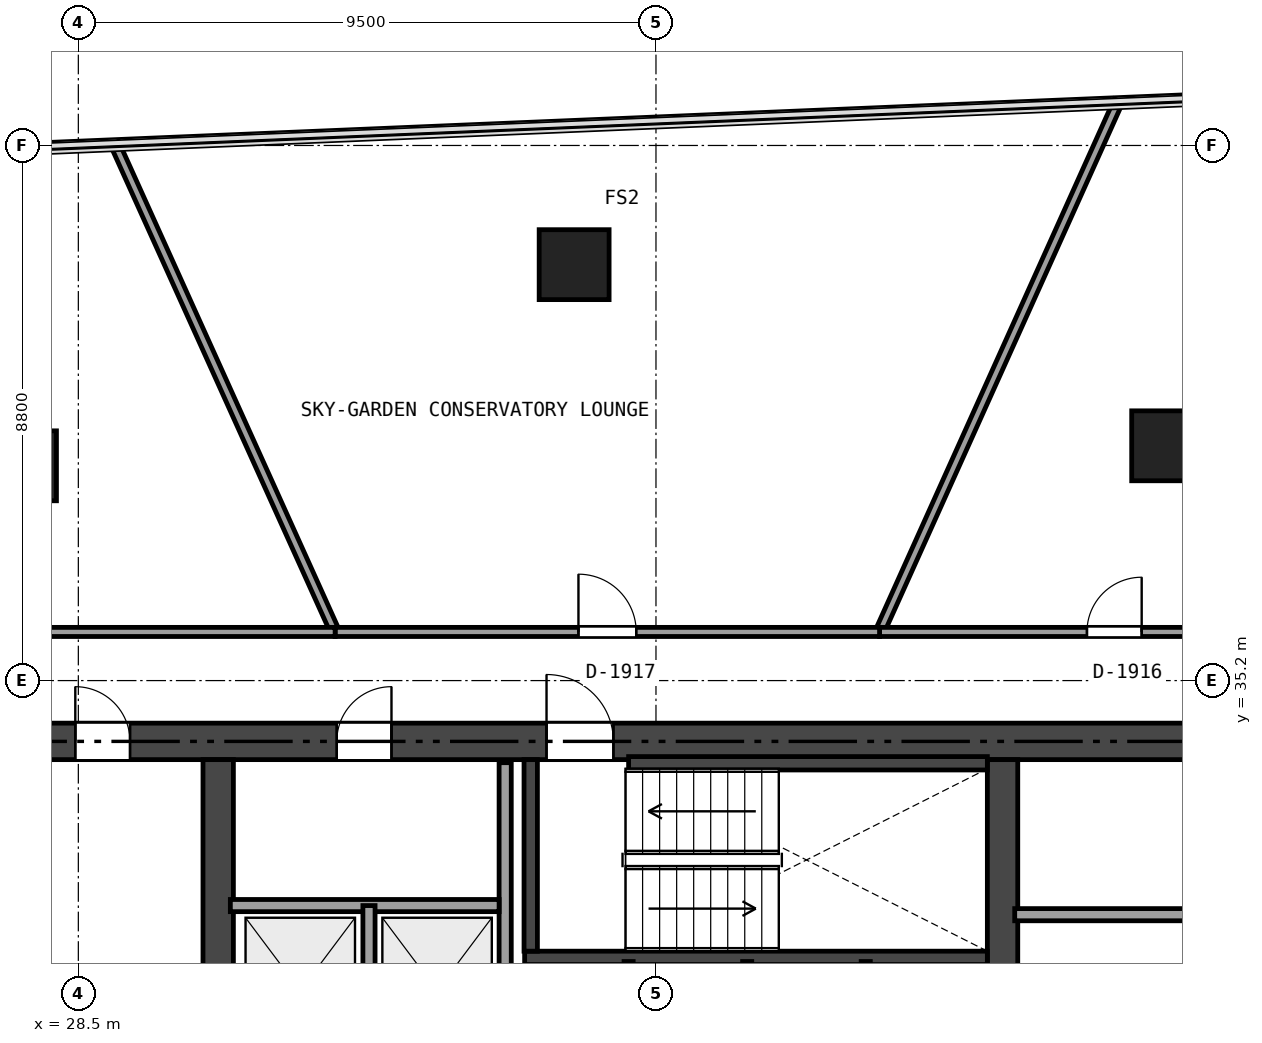
"""IFC4 building model, lengths in metres.
Left out: names, types, materials, properties, quantities, classifications, styles, units other than length and angle.
Written with IfcOpenShell. Run it as: python <this file> out.ifc"""

import sys

from ifc_helpers import new_model, si_unit, direction, frame, frame_2d, origin, origin_2d, place, context, subcontext, project, spatial, rectangle, extrude, element, fill, save


model = new_model("IFC4")
c1 = context("Model", 3, precision=1e-05, world=origin(), true_north=direction((0.0, 1.0)))
c2 = subcontext(c1, "Body", "Model", "MODEL_VIEW")
j1 = project(units=[si_unit("LENGTHUNIT", "METRE"), si_unit("PLANEANGLEUNIT", "RADIAN")], contexts=[c1])
p1 = place(None, origin())
s1 = spatial("IfcSite", under=j1, at=p1, CompositionType="ELEMENT")
p2 = place(p1, origin())
s2 = spatial("IfcBuilding", under=s1, at=p2, CompositionType="ELEMENT")
p3 = place(p2, frame((0.0, 0.0, 76.35)))
s3 = spatial("IfcBuildingStorey", under=s2, at=p3, CompositionType="ELEMENT", Elevation=76.35)
p4 = place(p3, frame((26.5, 34.2, 0.0), z_axis=(0.0, 0.0, 1.0), x_axis=(1.0, 0.0, 0.0)))
e1 = element("IfcWall", 1, at=p4, inside=s3, PredefinedType="SHEAR", context=c2, shape_type="SweptSolid", body=[
    extrude(rectangle(XDim=21.4, YDim=0.6, at=frame_2d((10.7, 0.0))), origin(), (0.0, 0.0, 1.0), 3.17),
])
p5 = place(p4, frame((9.7, 0.0, 0.0)))
e2 = element("IfcOpeningElement", 2, at=p5, cuts=e1, PredefinedType="OPENING", context=c2, shape_type="SweptSolid", body=[
    extrude(rectangle(XDim=1.1, YDim=2.15, at=frame_2d((0.55, 1.075))), frame((0.0, 0.31, 0.0), z_axis=(0.0, -1.0, 0.0), x_axis=(1.0, 0.0, 0.0)), (0.0, 0.0, 1.0), 0.62),
])
p6 = place(p4, frame((1.95, 0.0, 0.0)))
e3 = element("IfcOpeningElement", 3, at=p6, cuts=e1, PredefinedType="OPENING", context=c2, shape_type="SweptSolid", body=[
    extrude(rectangle(XDim=0.9, YDim=2.1, at=frame_2d((0.45, 1.05))), frame((0.0, 0.31, 0.0), z_axis=(0.0, -1.0, 0.0), x_axis=(1.0, 0.0, 0.0)), (0.0, 0.0, 1.0), 0.62),
])
p7 = place(p4, frame((6.25, 0.0, 0.0)))
e4 = element("IfcOpeningElement", 4, at=p7, cuts=e1, PredefinedType="OPENING", context=c2, shape_type="SweptSolid", body=[
    extrude(rectangle(XDim=0.9, YDim=2.1, at=frame_2d((0.45, 1.05))), frame((0.0, 0.31, 0.0), z_axis=(0.0, -1.0, 0.0), x_axis=(1.0, 0.0, 0.0)), (0.0, 0.0, 1.0), 0.62),
])
p8 = place(p3, frame((30.8, 18.9, 0.0), z_axis=(0.0, 0.0, 1.0), x_axis=(0.0, 1.0, 0.0)))
e5 = element("IfcWall", 5, at=p8, inside=s3, PredefinedType="SHEAR", context=c2, shape_type="SweptSolid", body=[
    extrude(rectangle(XDim=15.0, YDim=0.5, at=frame_2d((7.5, 0.0))), origin(), (0.0, 0.0, 1.0), 3.17),
])
p9 = place(p8, frame((6.6, 0.0, 0.0)))
e6 = element("IfcOpeningElement", 6, at=p9, cuts=e5, PredefinedType="OPENING", context=c2, shape_type="SweptSolid", body=[
    extrude(rectangle(XDim=1.1, YDim=2.15, at=frame_2d((0.55, 1.075))), frame((0.0, 0.26, 0.0), z_axis=(0.0, -1.0, 0.0), x_axis=(1.0, 0.0, 0.0)), (0.0, 0.0, 1.0), 0.52),
])
p10 = place(p8, frame((8.4, 0.0, 0.0)))
e7 = element("IfcOpeningElement", 7, at=p10, cuts=e5, PredefinedType="OPENING", context=c2, shape_type="SweptSolid", body=[
    extrude(rectangle(XDim=0.9, YDim=2.1, at=frame_2d((0.45, 1.05))), frame((0.0, 0.26, 0.0), z_axis=(0.0, -1.0, 0.0), x_axis=(1.0, 0.0, 0.0)), (0.0, 0.0, 1.0), 0.52),
])
p11 = place(p3, frame((43.7, 18.9, 0.0), z_axis=(0.0, 0.0, 1.0), x_axis=(0.0, 1.0, 0.0)))
e8 = element("IfcWall", 8, at=p11, inside=s3, PredefinedType="SHEAR", context=c2, shape_type="SweptSolid", body=[
    extrude(rectangle(XDim=15.0, YDim=0.5, at=frame_2d((7.5, 0.0))), origin(), (0.0, 0.0, 1.0), 3.17),
])
p12 = place(p11, frame((8.1, 0.0, 0.0)))
e9 = element("IfcOpeningElement", 9, at=p12, cuts=e8, PredefinedType="OPENING", context=c2, shape_type="SweptSolid", body=[
    extrude(rectangle(XDim=0.9, YDim=2.1, at=frame_2d((0.45, 1.05))), frame((0.0, 0.26, 0.0), z_axis=(0.0, -1.0, 0.0), x_axis=(1.0, 0.0, 0.0)), (0.0, 0.0, 1.0), 0.52),
])
p13 = place(p3, frame((35.84, 30.64, 0.0), z_axis=(0.0, 0.0, 1.0), x_axis=(1.0, 0.0, 0.0)))
e10 = element("IfcWall", 10, at=p13, inside=s3, PredefinedType="SHEAR", context=c2, shape_type="SweptSolid", body=[
    extrude(rectangle(XDim=7.61, YDim=0.22, at=frame_2d((3.805, 0.0))), origin(), (0.0, 0.0, 1.0), 3.17),
])
p14 = place(p3, frame((35.94, 30.75, 0.0), z_axis=(0.0, 0.0, 1.0), x_axis=(0.0, 1.0, 0.0)))
e11 = element("IfcWall", 11, at=p14, inside=s3, PredefinedType="SHEAR", context=c2, shape_type="SweptSolid", body=[
    extrude(rectangle(XDim=3.15, YDim=0.22, at=frame_2d((1.575, 0.0))), origin(), (0.0, 0.0, 1.0), 3.17),
])
p15 = place(p3, frame((37.55, 33.84, 0.0), z_axis=(0.0, 0.0, 1.0), x_axis=(1.0, 0.0, 0.0)))
e12 = element("IfcWall", 12, at=p15, inside=s3, PredefinedType="SHEAR", context=c2, shape_type="SweptSolid", body=[
    extrude(rectangle(XDim=5.9, YDim=0.22, at=frame_2d((2.95, 0.0))), origin(), (0.0, 0.0, 1.0), 3.17),
])
for number, where, z_axis, x_axis in (
    (13, (46.399, 39.061, -0.405), (0.0, 0.0, 1.0), (1.0, 0.0, 0.0)),
    (14, (36.654, 42.04, -0.405), (0.0, 0.0, 1.0), (1.0, 0.0, 0.0)),
    (15, (27.565, 38.732, -0.405), (0.0, 0.0, 1.0), (1.0, 0.0, 0.0)),
):
    element("IfcColumn", number, at=place(p3, frame(where, z_axis=z_axis, x_axis=x_axis)), inside=s3, PredefinedType="COLUMN", context=c2, shape_type="SweptSolid", body=[
        extrude(rectangle(XDim=1.15, YDim=1.15, at=origin_2d()), origin(), (0.0, 0.0, 1.0), 3.575),
    ])
p16 = place(p3, frame((43.9, 31.35, 0.0), z_axis=(0.0, 0.0, 1.0), x_axis=(1.0, 0.0, 0.0)))
e16 = element("IfcWall", 16, at=p16, inside=s3, PredefinedType="SOLIDWALL", context=c2, shape_type="SweptSolid", body=[
    extrude(rectangle(XDim=3.35, YDim=0.2, at=frame_2d((1.675, 0.0))), origin(), (0.0, 0.0, 1.0), 3.17),
])
p17 = place(p3, frame((35.52, 18.95, 0.0), z_axis=(0.0, 0.0, 1.0), x_axis=(0.0, 1.0, 0.0)))
e17 = element("IfcWall", 17, at=p17, inside=s3, PredefinedType="SOLIDWALL", context=c2, shape_type="SweptSolid", body=[
    extrude(rectangle(XDim=14.9, YDim=0.2, at=frame_2d((7.45, 0.0))), origin(), (0.0, 0.0, 1.0), 2.691),
])
p18 = place(p17, frame((7.755, 0.0, 0.0)))
e18 = element("IfcOpeningElement", 18, at=p18, cuts=e17, PredefinedType="OPENING", context=c2, shape_type="SweptSolid", body=[
    extrude(rectangle(XDim=0.95, YDim=2.15, at=frame_2d((0.475, 1.075))), frame((0.0, 0.11, 0.0), z_axis=(0.0, -1.0, 0.0), x_axis=(1.0, 0.0, 0.0)), (0.0, 0.0, 1.0), 0.22),
])
p19 = place(p17, frame((0.6, 0.0, 0.0)))
e19 = element("IfcOpeningElement", 19, at=p19, cuts=e17, PredefinedType="OPENING", context=c2, shape_type="SweptSolid", body=[
    extrude(rectangle(XDim=0.9, YDim=2.1, at=frame_2d((0.45, 1.05))), frame((0.0, 0.11, 0.0), z_axis=(0.0, -1.0, 0.0), x_axis=(1.0, 0.0, 0.0)), (0.0, 0.0, 1.0), 0.22),
])
p20 = place(p3, frame((31.0, 31.5, 0.0), z_axis=(0.0, 0.0, 1.0), x_axis=(1.0, 0.0, 0.0)))
e20 = element("IfcWall", 20, at=p20, inside=s3, PredefinedType="SOLIDWALL", context=c2, shape_type="SweptSolid", body=[
    extrude(rectangle(XDim=4.42, YDim=0.2, at=frame_2d((2.21, 0.0))), origin(), (0.0, 0.0, 1.0), 3.17),
])
p21 = place(p3, frame((33.28, 28.68, 0.0), z_axis=(0.0, 0.0, 1.0), x_axis=(0.0, 1.0, 0.0)))
e21 = element("IfcWall", 21, at=p21, inside=s3, PredefinedType="SOLIDWALL", context=c2, shape_type="SweptSolid", body=[
    extrude(rectangle(XDim=2.82, YDim=0.2, at=frame_2d((1.41, 0.0))), origin(), (0.0, 0.0, 1.0), 3.17),
])
for number, where, z_axis, x_axis in (
    (22, (37.55, 28.15, 0.0), (0.0, 0.0, 1.0), (0.0, 1.0, 0.0)),
    (23, (39.5, 28.15, 0.0), (0.0, 0.0, 1.0), (0.0, 1.0, 0.0)),
    (24, (41.45, 28.15, 0.0), (0.0, 0.0, 1.0), (0.0, 1.0, 0.0)),
):
    element("IfcWall", number, at=place(p3, frame(where, z_axis=z_axis, x_axis=x_axis)), inside=s3, PredefinedType="PARTITIONING", context=c2, shape_type="SweptSolid", body=[
        extrude(rectangle(XDim=2.43, YDim=0.15, at=frame_2d((1.215, 0.0))), origin(), (0.0, 0.0, 1.0), 3.17),
    ])
p22 = place(p3, frame((45.608, 44.735, 0.0), z_axis=(0.0, 0.0, 1.0), x_axis=(-0.410374215248, -0.911917213052, 0.0)))
e25 = element("IfcWall", 25, at=p22, inside=s3, PredefinedType="PARTITIONING", context=c2, shape_type="SweptSolid", body=[
    extrude(rectangle(XDim=9.579, YDim=0.15, at=frame_2d((4.79, 0.0))), origin(), (0.0, 0.0, 1.0), 2.455),
])
p23 = place(p3, frame((41.677, 36.0, 0.0), z_axis=(0.0, 0.0, 1.0), x_axis=(1.0, 0.0, 0.0)))
e26 = element("IfcWall", 26, at=p23, inside=s3, PredefinedType="PARTITIONING", context=c2, shape_type="SweptSolid", body=[
    extrude(rectangle(XDim=7.723, YDim=0.15, at=frame_2d((3.861, 0.0))), origin(), (0.0, 0.0, 1.0), 2.455),
])
p24 = place(p23, frame((3.411, 0.0, 0.0)))
e27 = element("IfcOpeningElement", 27, at=p24, cuts=e26, PredefinedType="OPENING", context=c2, shape_type="SweptSolid", body=[
    extrude(rectangle(XDim=0.9, YDim=2.0, at=frame_2d((0.45, 1.0))), frame((0.0, 0.085, 0.0), z_axis=(0.0, -1.0, 0.0), x_axis=(1.0, 0.0, 0.0)), (0.0, 0.0, 1.0), 0.17),
])
p25 = place(p3, frame((29.093, 44.04, 0.0), z_axis=(0.0, 0.0, 1.0), x_axis=(0.41148290583, -0.911417477455, 0.0)))
e28 = element("IfcWall", 28, at=p25, inside=s3, PredefinedType="PARTITIONING", context=c2, shape_type="SweptSolid", body=[
    extrude(rectangle(XDim=8.822, YDim=0.15, at=frame_2d((4.411, 0.0))), origin(), (0.0, 0.0, 1.0), 2.455),
])
p26 = place(p3, frame((32.723, 36.0, 0.0), z_axis=(0.0, 0.0, 1.0), x_axis=(1.0, 0.0, 0.0)))
e29 = element("IfcWall", 29, at=p26, inside=s3, PredefinedType="PARTITIONING", context=c2, shape_type="SweptSolid", body=[
    extrude(rectangle(XDim=8.954, YDim=0.15, at=frame_2d((4.477, 0.0))), origin(), (0.0, 0.0, 1.0), 2.467),
])
p27 = place(p26, frame((4.002, 0.0, 0.0)))
e30 = element("IfcOpeningElement", 30, at=p27, cuts=e29, PredefinedType="OPENING", context=c2, shape_type="SweptSolid", body=[
    extrude(rectangle(XDim=0.95, YDim=2.15, at=frame_2d((0.475, 1.075))), frame((0.0, 0.085, 0.0), z_axis=(0.0, -1.0, 0.0), x_axis=(1.0, 0.0, 0.0)), (0.0, 0.0, 1.0), 0.17),
])
p28 = place(p3, frame((26.8, 36.0, 0.0), z_axis=(0.0, 0.0, 1.0), x_axis=(1.0, 0.0, 0.0)))
e31 = element("IfcWall", 31, at=p28, inside=s3, PredefinedType="PARTITIONING", context=c2, shape_type="SweptSolid", body=[
    extrude(rectangle(XDim=5.923, YDim=0.15, at=frame_2d((2.961, 0.0))), origin(), (0.0, 0.0, 1.0), 2.467),
])
p29 = place(p5, origin())
e32 = element("IfcDoor", 32, at=p29, inside=s3, OperationType="SINGLE_SWING_LEFT", PredefinedType="DOOR", context=c2, shape_type="SweptSolid", body=[
    extrude(rectangle(XDim=1.1, YDim=2.15, at=frame_2d((0.55, 1.075))), frame((0.0, 0.025, 0.0), z_axis=(0.0, -1.0, 0.0), x_axis=(1.0, 0.0, 0.0)), (0.0, 0.0, 1.0), 0.05),
])
fill(e2, e32)
p30 = place(p6, origin())
e33 = element("IfcDoor", 33, at=p30, inside=s3, OperationType="SINGLE_SWING_LEFT", PredefinedType="DOOR", context=c2, shape_type="SweptSolid", body=[
    extrude(rectangle(XDim=0.9, YDim=2.1, at=frame_2d((0.45, 1.05))), frame((0.0, 0.025, 0.0), z_axis=(0.0, -1.0, 0.0), x_axis=(1.0, 0.0, 0.0)), (0.0, 0.0, 1.0), 0.05),
])
fill(e3, e33)
p31 = place(p7, origin())
e34 = element("IfcDoor", 34, at=p31, inside=s3, OperationType="SINGLE_SWING_RIGHT", PredefinedType="DOOR", context=c2, shape_type="SweptSolid", body=[
    extrude(rectangle(XDim=0.9, YDim=2.1, at=frame_2d((0.45, 1.05))), frame((0.0, 0.025, 0.0), z_axis=(0.0, -1.0, 0.0), x_axis=(1.0, 0.0, 0.0)), (0.0, 0.0, 1.0), 0.05),
])
fill(e4, e34)
p32 = place(p24, origin())
e35 = element("IfcDoor", 35, at=p32, inside=s3, OperationType="SINGLE_SWING_RIGHT", PredefinedType="DOOR", context=c2, shape_type="SweptSolid", body=[
    extrude(rectangle(XDim=0.9, YDim=2.0, at=frame_2d((0.45, 1.0))), frame((0.0, 0.025, 0.0), z_axis=(0.0, -1.0, 0.0), x_axis=(1.0, 0.0, 0.0)), (0.0, 0.0, 1.0), 0.05),
])
fill(e27, e35)
p33 = place(p27, origin())
e36 = element("IfcDoor", 36, at=p33, inside=s3, OperationType="SINGLE_SWING_LEFT", PredefinedType="DOOR", context=c2, shape_type="SweptSolid", body=[
    extrude(rectangle(XDim=0.95, YDim=2.15, at=frame_2d((0.475, 1.075))), frame((0.0, 0.025, 0.0), z_axis=(0.0, -1.0, 0.0), x_axis=(1.0, 0.0, 0.0)), (0.0, 0.0, 1.0), 0.05),
])
fill(e30, e36)
save(model, sys.argv[1])
